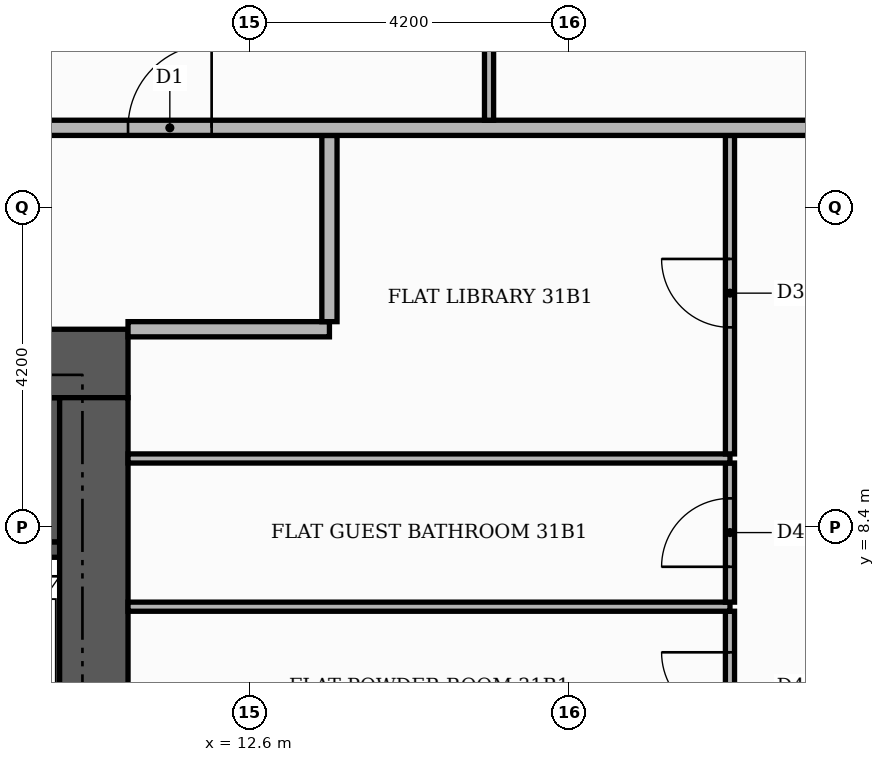
"""IFC4 building model, lengths in metres.
Left out: names, types, materials, properties, quantities, classifications, styles, units other than length and angle.
Written with IfcOpenShell. Run it as: python <this file> out.ifc"""

import sys

from ifc_helpers import new_model, si_unit, direction, frame, frame_2d, origin, place, context, subcontext, project, spatial, rectangle, extrude, element, fill, save


model = new_model("IFC4")
c1 = context("Model", 3, precision=1e-05, world=origin(), true_north=direction((0.0, 1.0)))
c2 = subcontext(c1, "Body", "Model", "MODEL_VIEW")
j1 = project(units=[si_unit("LENGTHUNIT", "METRE"), si_unit("PLANEANGLEUNIT", "RADIAN")], contexts=[c1])
p1 = place(None, origin())
s1 = spatial("IfcSite", under=j1, at=p1, CompositionType="ELEMENT")
p2 = place(p1, origin())
s2 = spatial("IfcBuilding", under=s1, at=p2, CompositionType="ELEMENT")
p3 = place(p2, frame((0.0, 0.0, 133.8)))
s3 = spatial("IfcBuildingStorey", under=s2, at=p3, CompositionType="ELEMENT", Elevation=133.8)
p4 = place(p3, frame((5.5, 9.15, 0.0), z_axis=(0.0, 0.0, 1.0), x_axis=(1.0, 0.0, 0.0)))
e1 = element("IfcWall", 1, at=p4, inside=s3, PredefinedType="SHEAR", context=c2, shape_type="SweptSolid", body=[
    extrude(rectangle(XDim=4.6, YDim=1.9, at=frame_2d((2.3, 0.0))), origin(), (0.0, 0.0, 1.0), 3.48),
])
p5 = place(p3, frame((8.1, 8.1, 0.0), z_axis=(0.0, 0.0, 1.0), x_axis=(1.0, 0.0, 0.0)))
e2 = element("IfcWall", 2, at=p5, inside=s3, PredefinedType="SHEAR", context=c2, shape_type="SweptSolid", body=[
    extrude(rectangle(XDim=2.0, YDim=0.2, at=frame_2d((1.0, 0.0))), origin(), (0.0, 0.0, 1.0), 3.48),
])
p6 = place(p3, frame((-11.0, 10.55, 0.0), z_axis=(0.0, 0.0, 1.0), x_axis=(1.0, 0.0, 0.0)))
e3 = element("IfcWall", 3, at=p6, inside=s3, PredefinedType="SHEAR", context=c2, shape_type="SweptSolid", body=[
    extrude(rectangle(XDim=22.0, YDim=0.9, at=frame_2d((11.0, 0.0))), origin(), (0.0, 0.0, 1.0), 3.48),
])
p7 = place(p6, frame((13.3, 0.0, 0.0)))
e4 = element("IfcOpeningElement", 4, at=p7, cuts=e3, PredefinedType="OPENING", context=c2, shape_type="SweptSolid", body=[
    extrude(rectangle(XDim=1.8, YDim=2.2, at=frame_2d((0.9, 1.1))), frame((0.0, 0.46, 0.0), z_axis=(0.0, -1.0, 0.0), x_axis=(1.0, 0.0, 0.0)), (0.0, 0.0, 1.0), 0.92),
])
p8 = place(p3, frame((10.55, -10.1, 0.0), z_axis=(0.0, 0.0, 1.0), x_axis=(0.0, 1.0, 0.0)))
e5 = element("IfcWall", 5, at=p8, inside=s3, PredefinedType="SHEAR", context=c2, shape_type="SweptSolid", body=[
    extrude(rectangle(XDim=20.2, YDim=0.9, at=frame_2d((10.1, 0.0))), origin(), (0.0, 0.0, 1.0), 3.48),
])
p9 = place(p3, frame((18.92, 5.31, 0.0), z_axis=(0.0, 0.0, 1.0), x_axis=(0.0, 1.0, 0.0)))
e6 = element("IfcWall", 6, at=p9, inside=s3, PredefinedType="PARTITIONING", context=c2, shape_type="SweptSolid", body=[
    extrude(rectangle(XDim=1.98, YDim=0.12, at=frame_2d((0.99, 0.0))), origin(), (0.0, 0.0, 1.0), 3.48),
])
p10 = place(p9, frame((0.54, 0.0, 0.0)))
e7 = element("IfcOpeningElement", 7, at=p10, cuts=e6, PredefinedType="OPENING", context=c2, shape_type="SweptSolid", body=[
    extrude(rectangle(XDim=0.9, YDim=2.1, at=frame_2d((0.45, 1.05))), frame((0.0, 0.07, 0.0), z_axis=(0.0, -1.0, 0.0), x_axis=(1.0, 0.0, 0.0)), (0.0, 0.0, 1.0), 0.14),
])
p11 = place(p3, frame((11.0, 7.35, 0.0), z_axis=(0.0, 0.0, 1.0), x_axis=(1.0, 0.0, 0.0)))
e8 = element("IfcWall", 8, at=p11, inside=s3, PredefinedType="PARTITIONING", context=c2, shape_type="SweptSolid", body=[
    extrude(rectangle(XDim=7.92, YDim=0.12, at=frame_2d((3.96, 0.0))), origin(), (0.0, 0.0, 1.0), 3.48),
])
p12 = place(p3, frame((18.92, 7.41, 0.0), z_axis=(0.0, 0.0, 1.0), x_axis=(0.0, 1.0, 0.0)))
e9 = element("IfcWall", 9, at=p12, inside=s3, PredefinedType="PARTITIONING", context=c2, shape_type="SweptSolid", body=[
    extrude(rectangle(XDim=1.83, YDim=0.12, at=frame_2d((0.915, 0.0))), origin(), (0.0, 0.0, 1.0), 3.48),
])
p13 = place(p12, frame((0.465, 0.0, 0.0)))
e10 = element("IfcOpeningElement", 10, at=p13, cuts=e9, PredefinedType="OPENING", context=c2, shape_type="SweptSolid", body=[
    extrude(rectangle(XDim=0.9, YDim=2.1, at=frame_2d((0.45, 1.05))), frame((0.0, 0.07, 0.0), z_axis=(0.0, -1.0, 0.0), x_axis=(1.0, 0.0, 0.0)), (0.0, 0.0, 1.0), 0.14),
])
p14 = place(p3, frame((11.0, 9.3, 0.0), z_axis=(0.0, 0.0, 1.0), x_axis=(1.0, 0.0, 0.0)))
e11 = element("IfcWall", 11, at=p14, inside=s3, PredefinedType="PARTITIONING", context=c2, shape_type="SweptSolid", body=[
    extrude(rectangle(XDim=7.92, YDim=0.12, at=frame_2d((3.96, 0.0))), origin(), (0.0, 0.0, 1.0), 3.48),
])
p15 = place(p3, frame((18.92, 9.36, 0.0), z_axis=(0.0, 0.0, 1.0), x_axis=(0.0, 1.0, 0.0)))
e12 = element("IfcWall", 12, at=p15, inside=s3, PredefinedType="PARTITIONING", context=c2, shape_type="SweptSolid", body=[
    extrude(rectangle(XDim=4.19, YDim=0.12, at=frame_2d((2.095, 0.0))), origin(), (0.0, 0.0, 1.0), 3.48),
])
p16 = place(p15, frame((1.665, 0.0, 0.0)))
e13 = element("IfcOpeningElement", 13, at=p16, cuts=e12, PredefinedType="OPENING", context=c2, shape_type="SweptSolid", body=[
    extrude(rectangle(XDim=0.9, YDim=2.1, at=frame_2d((0.45, 1.05))), frame((0.0, 0.07, 0.0), z_axis=(0.0, -1.0, 0.0), x_axis=(1.0, 0.0, 0.0)), (0.0, 0.0, 1.0), 0.14),
])
p17 = place(p3, frame((11.0, 11.0, 0.0), z_axis=(0.0, 0.0, 1.0), x_axis=(1.0, 0.0, 0.0)))
e14 = element("IfcWall", 14, at=p17, inside=s3, PredefinedType="PARTITIONING", context=c2, shape_type="SweptSolid", body=[
    extrude(rectangle(XDim=2.65, YDim=0.2, at=frame_2d((1.325, 0.0))), origin(), (0.0, 0.0, 1.0), 3.48),
])
p18 = place(p3, frame((13.65, 11.1, 0.0), z_axis=(0.0, 0.0, 1.0), x_axis=(0.0, 1.0, 0.0)))
e15 = element("IfcWall", 15, at=p18, inside=s3, PredefinedType="PARTITIONING", context=c2, shape_type="SweptSolid", body=[
    extrude(rectangle(XDim=2.45, YDim=0.2, at=frame_2d((1.225, 0.0))), origin(), (0.0, 0.0, 1.0), 3.48),
])
p19 = place(p3, frame((-13.65, 13.65, 0.0), z_axis=(0.0, 0.0, 1.0), x_axis=(1.0, 0.0, 0.0)))
e16 = element("IfcWall", 16, at=p19, inside=s3, PredefinedType="PARTITIONING", context=c2, shape_type="SweptSolid", body=[
    extrude(rectangle(XDim=39.07, YDim=0.2, at=frame_2d((19.535, 0.0))), origin(), (0.0, 0.0, 1.0), 3.48),
])
p20 = place(p19, frame((24.65, 0.0, 0.0)))
e17 = element("IfcOpeningElement", 17, at=p20, cuts=e16, PredefinedType="OPENING", context=c2, shape_type="SweptSolid", body=[
    extrude(rectangle(XDim=1.1, YDim=2.4, at=frame_2d((0.55, 1.2))), frame((0.0, 0.11, 0.0), z_axis=(0.0, -1.0, 0.0), x_axis=(1.0, 0.0, 0.0)), (0.0, 0.0, 1.0), 0.22),
])
p21 = place(p19, frame((12.05, 0.0, 0.0)))
e18 = element("IfcOpeningElement", 18, at=p21, cuts=e16, PredefinedType="OPENING", context=c2, shape_type="SweptSolid", body=[
    extrude(rectangle(XDim=1.1, YDim=2.4, at=frame_2d((0.55, 1.2))), frame((0.0, 0.11, 0.0), z_axis=(0.0, -1.0, 0.0), x_axis=(1.0, 0.0, 0.0)), (0.0, 0.0, 1.0), 0.22),
])
p22 = place(p3, frame((15.75, 13.75, 0.0), z_axis=(0.0, 0.0, 1.0), x_axis=(0.0, 1.0, 0.0)))
e19 = element("IfcWall", 19, at=p22, inside=s3, PredefinedType="PARTITIONING", context=c2, shape_type="SweptSolid", body=[
    extrude(rectangle(XDim=6.61, YDim=0.12, at=frame_2d((3.305, 0.0))), origin(), (0.0, 0.0, 1.0), 3.48),
])
p23 = place(p22, frame((2.785, 0.0, 0.0)))
e20 = element("IfcOpeningElement", 20, at=p23, cuts=e19, PredefinedType="OPENING", context=c2, shape_type="SweptSolid", body=[
    extrude(rectangle(XDim=1.0, YDim=2.1, at=frame_2d((0.5, 1.05))), frame((0.0, 0.07, 0.0), z_axis=(0.0, -1.0, 0.0), x_axis=(1.0, 0.0, 0.0)), (0.0, 0.0, 1.0), 0.14),
])
p24 = place(p10, origin())
e21 = element("IfcDoor", 21, at=p24, inside=s3, OperationType="SINGLE_SWING_RIGHT", PredefinedType="DOOR", context=c2, shape_type="SweptSolid", body=[
    extrude(rectangle(XDim=0.9, YDim=2.1, at=frame_2d((0.45, 1.05))), frame((0.0, 0.025, 0.0), z_axis=(0.0, -1.0, 0.0), x_axis=(1.0, 0.0, 0.0)), (0.0, 0.0, 1.0), 0.05),
])
fill(e7, e21)
p25 = place(p13, origin())
e22 = element("IfcDoor", 22, at=p25, inside=s3, OperationType="SINGLE_SWING_LEFT", PredefinedType="DOOR", context=c2, shape_type="SweptSolid", body=[
    extrude(rectangle(XDim=0.9, YDim=2.1, at=frame_2d((0.45, 1.05))), frame((0.0, 0.025, 0.0), z_axis=(0.0, -1.0, 0.0), x_axis=(1.0, 0.0, 0.0)), (0.0, 0.0, 1.0), 0.05),
])
fill(e10, e22)
p26 = place(p16, origin())
e23 = element("IfcDoor", 23, at=p26, inside=s3, OperationType="SINGLE_SWING_RIGHT", PredefinedType="DOOR", context=c2, shape_type="SweptSolid", body=[
    extrude(rectangle(XDim=0.9, YDim=2.1, at=frame_2d((0.45, 1.05))), frame((0.0, 0.025, 0.0), z_axis=(0.0, -1.0, 0.0), x_axis=(1.0, 0.0, 0.0)), (0.0, 0.0, 1.0), 0.05),
])
fill(e13, e23)
p27 = place(p20, origin())
e24 = element("IfcDoor", 24, at=p27, inside=s3, OperationType="SINGLE_SWING_RIGHT", PredefinedType="DOOR", context=c2, shape_type="SweptSolid", body=[
    extrude(rectangle(XDim=1.1, YDim=2.4, at=frame_2d((0.55, 1.2))), frame((0.0, 0.025, 0.0), z_axis=(0.0, -1.0, 0.0), x_axis=(1.0, 0.0, 0.0)), (0.0, 0.0, 1.0), 0.05),
])
fill(e17, e24)
save(model, sys.argv[1])
